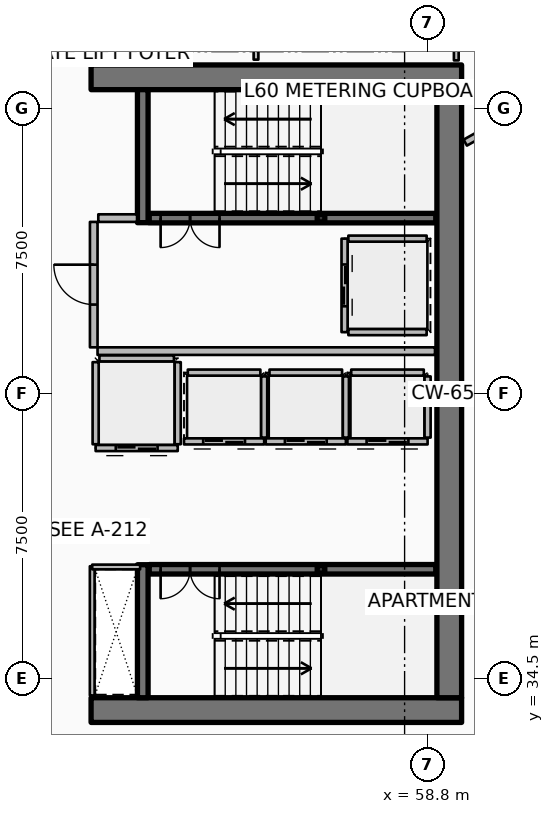
"""IFC4 building model, lengths in metres.
Left out: names, types, materials, properties, quantities, classifications, styles, units other than length and angle.
Written with IfcOpenShell. Run it as: python <this file> out.ifc"""

import sys

from ifc_helpers import new_model, si_unit, direction, frame, frame_2d, origin, origin_2d, place, context, subcontext, project, spatial, rectangle, hollow_rectangle, extrude, element, fill, save


model = new_model("IFC4")
c1 = context("Model", 3, precision=1e-05, world=origin(), true_north=direction((0.0, 1.0)))
c2 = subcontext(c1, "Body", "Model", "MODEL_VIEW")
j1 = project(units=[si_unit("LENGTHUNIT", "METRE"), si_unit("PLANEANGLEUNIT", "RADIAN")], contexts=[c1])
p1 = place(None, origin())
s1 = spatial("IfcSite", under=j1, at=p1, CompositionType="ELEMENT")
p2 = place(p1, origin())
s2 = spatial("IfcBuilding", under=s1, at=p2, CompositionType="ELEMENT")
p3 = place(p2, frame((0.0, 0.0, 240.55)))
s3 = spatial("IfcBuildingStorey", under=s2, at=p3, CompositionType="ELEMENT", Elevation=240.55)
for number, where, z_axis, x_axis in (
    (1, (49.95, 33.675, 0.0), (0.0, 0.0, 1.0), (1.0, 0.0, 0.0)),
    (2, (49.95, 50.325, 0.0), (0.0, 0.0, 1.0), (1.0, 0.0, 0.0)),
):
    element("IfcWall", number, at=place(p3, frame(where, z_axis=z_axis, x_axis=x_axis)), inside=s3, PredefinedType="SHEAR", context=c2, shape_type="SweptSolid", body=[
        extrude(rectangle(XDim=9.75, YDim=0.65, at=frame_2d((4.875, 0.0))), origin(), (0.0, 0.0, 1.0), 3.85),
    ])
p4 = place(p3, frame((59.375, 34.0, 0.0), z_axis=(0.0, 0.0, 1.0), x_axis=(0.0, 1.0, 0.0)))
e3 = element("IfcWall", 3, at=p4, inside=s3, PredefinedType="SHEAR", context=c2, shape_type="SweptSolid", body=[
    extrude(rectangle(XDim=16.0, YDim=0.65, at=frame_2d((8.0, 0.0))), origin(), (0.0, 0.0, 1.0), 3.85),
])
for number, where, z_axis, x_axis in (
    (4, (51.31, 46.5, 0.0), (0.0, 0.0, 1.0), (0.0, 1.0, 0.0)),
    (5, (51.31, 34.0, 0.0), (0.0, 0.0, 1.0), (0.0, 1.0, 0.0)),
):
    element("IfcWall", number, at=place(p3, frame(where, z_axis=z_axis, x_axis=x_axis)), inside=s3, PredefinedType="SHEAR", context=c2, shape_type="SweptSolid", body=[
        extrude(rectangle(XDim=3.5, YDim=0.28, at=frame_2d((1.75, 0.0))), origin(), (0.0, 0.0, 1.0), 3.85),
    ])
for number, where, z_axis, x_axis in (
    (6, (56.0, 46.62, 0.0), (0.0, 0.0, 1.0), (1.0, 0.0, 0.0)),
    (7, (56.0, 37.38, 0.0), (0.0, 0.0, 1.0), (1.0, 0.0, 0.0)),
):
    element("IfcColumn", number, at=place(p3, frame(where, z_axis=z_axis, x_axis=x_axis)), inside=s3, PredefinedType="COLUMN", context=c2, shape_type="SweptSolid", body=[
        extrude(hollow_rectangle(XDim=0.2, YDim=0.2, WallThickness=0.01, InnerFilletRadius=0.01, OuterFilletRadius=0.02, at=origin_2d()), origin(), (0.0, 0.0, 1.0), 1.72),
    ])
p5 = place(p3, frame((51.48, 46.62, 0.0), z_axis=(0.0, 0.0, 1.0), x_axis=(1.0, 0.0, 0.0)))
e8 = element("IfcWall", 8, at=p5, inside=s3, PredefinedType="SOLIDWALL", context=c2, shape_type="SweptSolid", body=[
    extrude(rectangle(XDim=7.54, YDim=0.25, at=frame_2d((3.77, 0.0))), origin(), (0.0, 0.0, 1.0), 3.59),
])
p6 = place(p5, frame((0.3, 0.0, 0.0)))
e9 = element("IfcOpeningElement", 9, at=p6, cuts=e8, PredefinedType="OPENING", context=c2, shape_type="SweptSolid", body=[
    extrude(rectangle(XDim=1.55, YDim=2.15, at=frame_2d((0.775, 1.075))), frame((0.0, 0.135, 0.0), z_axis=(0.0, -1.0, 0.0), x_axis=(1.0, 0.0, 0.0)), (0.0, 0.0, 1.0), 0.27),
])
p7 = place(p3, frame((51.48, 37.38, 0.0), z_axis=(0.0, 0.0, 1.0), x_axis=(1.0, 0.0, 0.0)))
e10 = element("IfcWall", 10, at=p7, inside=s3, PredefinedType="SOLIDWALL", context=c2, shape_type="SweptSolid", body=[
    extrude(rectangle(XDim=7.54, YDim=0.25, at=frame_2d((3.77, 0.0))), origin(), (0.0, 0.0, 1.0), 3.59),
])
p8 = place(p7, frame((0.3, 0.0, 0.0)))
e11 = element("IfcOpeningElement", 11, at=p8, cuts=e10, PredefinedType="OPENING", context=c2, shape_type="SweptSolid", body=[
    extrude(rectangle(XDim=1.55, YDim=2.15, at=frame_2d((0.775, 1.075))), frame((0.0, 0.135, 0.0), z_axis=(0.0, -1.0, 0.0), x_axis=(1.0, 0.0, 0.0)), (0.0, 0.0, 1.0), 0.27),
])
p9 = place(p3, frame((54.505, 40.745, 0.0), z_axis=(0.0, 0.0, 1.0), x_axis=(-1.0, 0.0, 0.0)))
e12 = element("IfcWall", 12, at=p9, inside=s3, PredefinedType="PARTITIONING", context=c2, shape_type="SweptSolid", body=[
    extrude(rectangle(XDim=2.11, YDim=0.16, at=frame_2d((1.055, 0.0))), origin(), (0.0, 0.0, 1.0), 3.59),
])
p10 = place(p9, frame((0.505, 0.0, 0.0)))
e13 = element("IfcOpeningElement", 13, at=p10, cuts=e12, PredefinedType="OPENING", context=c2, shape_type="SweptSolid", body=[
    extrude(rectangle(XDim=1.1, YDim=2.1, at=frame_2d((0.55, 1.05))), frame((0.0, 0.09, 0.0), z_axis=(0.0, -1.0, 0.0), x_axis=(1.0, 0.0, 0.0)), (0.0, 0.0, 1.0), 0.18),
])
p11 = place(p3, frame((54.505, 40.845, 0.0), z_axis=(0.0, 0.0, 1.0), x_axis=(0.0, 1.0, 0.0)))
e14 = element("IfcWall", 14, at=p11, inside=s3, PredefinedType="PARTITIONING", context=c2, shape_type="SweptSolid", body=[
    extrude(rectangle(XDim=1.61, YDim=0.16, at=frame_2d((0.805, 0.0))), origin(), (0.0, 0.0, 1.0), 3.59),
])
p12 = place(p3, frame((52.495, 42.555, 0.0), z_axis=(0.0, 0.0, 1.0), x_axis=(1.0, 0.0, 0.0)))
e15 = element("IfcWall", 15, at=p12, inside=s3, PredefinedType="PARTITIONING", context=c2, shape_type="SweptSolid", body=[
    extrude(rectangle(XDim=1.91, YDim=0.16, at=frame_2d((0.955, 0.0))), origin(), (0.0, 0.0, 1.0), 3.59),
])
p13 = place(p3, frame((56.655, 40.745, 0.0), z_axis=(0.0, 0.0, 1.0), x_axis=(-1.0, 0.0, 0.0)))
e16 = element("IfcWall", 16, at=p13, inside=s3, PredefinedType="PARTITIONING", context=c2, shape_type="SweptSolid", body=[
    extrude(rectangle(XDim=2.11, YDim=0.16, at=frame_2d((1.055, 0.0))), origin(), (0.0, 0.0, 1.0), 3.59),
])
p14 = place(p13, frame((0.505, 0.0, 0.0)))
e17 = element("IfcOpeningElement", 17, at=p14, cuts=e16, PredefinedType="OPENING", context=c2, shape_type="SweptSolid", body=[
    extrude(rectangle(XDim=1.1, YDim=2.1, at=frame_2d((0.55, 1.05))), frame((0.0, 0.09, 0.0), z_axis=(0.0, -1.0, 0.0), x_axis=(1.0, 0.0, 0.0)), (0.0, 0.0, 1.0), 0.18),
])
p15 = place(p3, frame((56.655, 40.845, 0.0), z_axis=(0.0, 0.0, 1.0), x_axis=(0.0, 1.0, 0.0)))
e18 = element("IfcWall", 18, at=p15, inside=s3, PredefinedType="PARTITIONING", context=c2, shape_type="SweptSolid", body=[
    extrude(rectangle(XDim=1.61, YDim=0.16, at=frame_2d((0.805, 0.0))), origin(), (0.0, 0.0, 1.0), 3.59),
])
p16 = place(p3, frame((54.645, 42.555, 0.0), z_axis=(0.0, 0.0, 1.0), x_axis=(1.0, 0.0, 0.0)))
e19 = element("IfcWall", 19, at=p16, inside=s3, PredefinedType="PARTITIONING", context=c2, shape_type="SweptSolid", body=[
    extrude(rectangle(XDim=1.91, YDim=0.16, at=frame_2d((0.955, 0.0))), origin(), (0.0, 0.0, 1.0), 3.59),
])
p17 = place(p3, frame((58.805, 40.745, 0.0), z_axis=(0.0, 0.0, 1.0), x_axis=(-1.0, 0.0, 0.0)))
e20 = element("IfcWall", 20, at=p17, inside=s3, PredefinedType="PARTITIONING", context=c2, shape_type="SweptSolid", body=[
    extrude(rectangle(XDim=2.11, YDim=0.16, at=frame_2d((1.055, 0.0))), origin(), (0.0, 0.0, 1.0), 3.59),
])
p18 = place(p17, frame((0.505, 0.0, 0.0)))
e21 = element("IfcOpeningElement", 21, at=p18, cuts=e20, PredefinedType="OPENING", context=c2, shape_type="SweptSolid", body=[
    extrude(rectangle(XDim=1.1, YDim=2.1, at=frame_2d((0.55, 1.05))), frame((0.0, 0.09, 0.0), z_axis=(0.0, -1.0, 0.0), x_axis=(1.0, 0.0, 0.0)), (0.0, 0.0, 1.0), 0.18),
])
p19 = place(p3, frame((58.805, 40.845, 0.0), z_axis=(0.0, 0.0, 1.0), x_axis=(0.0, 1.0, 0.0)))
e22 = element("IfcWall", 22, at=p19, inside=s3, PredefinedType="PARTITIONING", context=c2, shape_type="SweptSolid", body=[
    extrude(rectangle(XDim=1.61, YDim=0.16, at=frame_2d((0.805, 0.0))), origin(), (0.0, 0.0, 1.0), 3.59),
])
p20 = place(p3, frame((56.795, 42.555, 0.0), z_axis=(0.0, 0.0, 1.0), x_axis=(1.0, 0.0, 0.0)))
e23 = element("IfcWall", 23, at=p20, inside=s3, PredefinedType="PARTITIONING", context=c2, shape_type="SweptSolid", body=[
    extrude(rectangle(XDim=1.91, YDim=0.16, at=frame_2d((0.955, 0.0))), origin(), (0.0, 0.0, 1.0), 3.59),
])
p21 = place(p3, frame((56.62, 46.08, 0.0), z_axis=(0.0, 0.0, 1.0), x_axis=(0.0, -1.0, 0.0)))
e24 = element("IfcWall", 24, at=p21, inside=s3, PredefinedType="PARTITIONING", context=c2, shape_type="SweptSolid", body=[
    extrude(rectangle(XDim=2.46, YDim=0.16, at=frame_2d((1.23, 0.0))), origin(), (0.0, 0.0, 1.0), 3.59),
])
p22 = place(p21, frame((0.68, 0.0, 0.0)))
e25 = element("IfcOpeningElement", 25, at=p22, cuts=e24, PredefinedType="OPENING", context=c2, shape_type="SweptSolid", body=[
    extrude(rectangle(XDim=1.1, YDim=2.1, at=frame_2d((0.55, 1.05))), frame((0.0, 0.09, 0.0), z_axis=(0.0, -1.0, 0.0), x_axis=(1.0, 0.0, 0.0)), (0.0, 0.0, 1.0), 0.18),
])
for number, where, z_axis, x_axis in (
    (26, (56.72, 46.08, 0.0), (0.0, 0.0, 1.0), (1.0, 0.0, 0.0)),
    (27, (56.72, 43.62, 0.0), (0.0, 0.0, 1.0), (1.0, 0.0, 0.0)),
):
    element("IfcWall", number, at=place(p3, frame(where, z_axis=z_axis, x_axis=x_axis)), inside=s3, PredefinedType="PARTITIONING", context=c2, shape_type="SweptSolid", body=[
        extrude(rectangle(XDim=2.06, YDim=0.16, at=frame_2d((1.03, 0.0))), origin(), (0.0, 0.0, 1.0), 3.59),
    ])
p23 = place(p3, frame((52.23, 40.57, 0.0), z_axis=(0.0, 0.0, 1.0), x_axis=(-1.0, 0.0, 0.0)))
e28 = element("IfcWall", 28, at=p23, inside=s3, PredefinedType="PARTITIONING", context=c2, shape_type="SweptSolid", body=[
    extrude(rectangle(XDim=2.16, YDim=0.16, at=frame_2d((1.08, 0.0))), origin(), (0.0, 0.0, 1.0), 3.59),
])
p24 = place(p23, frame((0.53, 0.0, 0.0)))
e29 = element("IfcOpeningElement", 29, at=p24, cuts=e28, PredefinedType="OPENING", context=c2, shape_type="SweptSolid", body=[
    extrude(rectangle(XDim=1.1, YDim=2.1, at=frame_2d((0.55, 1.05))), frame((0.0, 0.09, 0.0), z_axis=(0.0, -1.0, 0.0), x_axis=(1.0, 0.0, 0.0)), (0.0, 0.0, 1.0), 0.18),
])
for number, where, z_axis, x_axis in (
    (30, (52.23, 40.67, 0.0), (0.0, 0.0, 1.0), (0.0, 1.0, 0.0)),
    (31, (50.07, 40.67, 0.0), (0.0, 0.0, 1.0), (0.0, 1.0, 0.0)),
):
    element("IfcWall", number, at=place(p3, frame(where, z_axis=z_axis, x_axis=x_axis)), inside=s3, PredefinedType="PARTITIONING", context=c2, shape_type="SweptSolid", body=[
        extrude(rectangle(XDim=2.16, YDim=0.16, at=frame_2d((1.08, 0.0))), origin(), (0.0, 0.0, 1.0), 3.59),
    ])
p25 = place(p3, frame((50.17, 42.93, 0.0), z_axis=(0.0, 0.0, 1.0), x_axis=(1.0, 0.0, 0.0)))
e32 = element("IfcWall", 32, at=p25, inside=s3, PredefinedType="PARTITIONING", context=c2, shape_type="SweptSolid", body=[
    extrude(rectangle(XDim=1.96, YDim=0.16, at=frame_2d((0.98, 0.0))), origin(), (0.0, 0.0, 1.0), 3.59),
])
p26 = place(p3, frame((50.12, 43.12, 0.0), z_axis=(0.0, 0.0, 1.0), x_axis=(1.0, 0.0, 0.0)))
e33 = element("IfcWall", 33, at=p26, inside=s3, PredefinedType="PARTITIONING", context=c2, shape_type="SweptSolid", body=[
    extrude(rectangle(XDim=8.88, YDim=0.2, at=frame_2d((4.44, 0.0))), origin(), (0.0, 0.0, 1.0), 3.59),
])
p27 = place(p3, frame((50.14, 46.62, 0.0), z_axis=(0.0, 0.0, 1.0), x_axis=(1.0, 0.0, 0.0)))
e34 = element("IfcWall", 34, at=p27, inside=s3, PredefinedType="PARTITIONING", context=c2, shape_type="SweptSolid", body=[
    extrude(rectangle(XDim=1.02, YDim=0.2, at=frame_2d((0.51, 0.0))), origin(), (0.0, 0.0, 1.0), 3.59),
])
p28 = place(p3, frame((50.02, 43.22, 0.0), z_axis=(0.0, 0.0, 1.0), x_axis=(0.0, 1.0, 0.0)))
e35 = element("IfcWall", 35, at=p28, inside=s3, PredefinedType="PARTITIONING", context=c2, shape_type="SweptSolid", body=[
    extrude(rectangle(XDim=3.3, YDim=0.2, at=frame_2d((1.65, 0.0))), origin(), (0.0, 0.0, 1.0), 3.59),
])
p29 = place(p28, frame((1.125, 0.0, 0.0)))
e36 = element("IfcOpeningElement", 36, at=p29, cuts=e35, PredefinedType="OPENING", context=c2, shape_type="SweptSolid", body=[
    extrude(rectangle(XDim=1.05, YDim=2.1, at=frame_2d((0.525, 1.05))), frame((0.0, 0.11, 0.0), z_axis=(0.0, -1.0, 0.0), x_axis=(1.0, 0.0, 0.0)), (0.0, 0.0, 1.0), 0.22),
])
p30 = place(p3, frame((49.98, 34.06, 0.0), z_axis=(0.0, 0.0, 1.0), x_axis=(0.0, 1.0, 0.0)))
e37 = element("IfcWall", 37, at=p30, inside=s3, PredefinedType="PARTITIONING", context=c2, shape_type="SweptSolid", body=[
    extrude(rectangle(XDim=3.4, YDim=0.125, at=frame_2d((1.7, 0.0))), origin(), (0.0, 0.0, 1.0), 3.03),
])
p31 = place(p3, frame((49.98, 37.44, 0.0), z_axis=(0.0, 0.0, 1.0), x_axis=(1.0, 0.0, 0.0)))
e38 = element("IfcWall", 38, at=p31, inside=s3, PredefinedType="PARTITIONING", context=c2, shape_type="SweptSolid", body=[
    extrude(rectangle(XDim=1.26, YDim=0.125, at=frame_2d((0.63, 0.0))), origin(), (0.0, 0.0, 1.0), 3.03),
])
p32 = place(p3, frame((59.56, 50.77, 0.0), z_axis=(0.0, 0.0, 1.0), x_axis=(0.0, 1.0, 0.0)))
e39 = element("IfcWall", 39, at=p32, inside=s3, PredefinedType="PARTITIONING", context=c2, shape_type="SweptSolid", body=[
    extrude(rectangle(XDim=1.54, YDim=0.125, at=frame_2d((0.77, 0.0))), origin(), (0.0, 0.0, 1.0), 3.03),
])
p33 = place(p3, frame((54.29, 50.79, 0.0), z_axis=(0.0, 0.0, 1.0), x_axis=(0.0, 1.0, 0.0)))
e40 = element("IfcWall", 40, at=p33, inside=s3, PredefinedType="PARTITIONING", context=c2, shape_type="SweptSolid", body=[
    extrude(rectangle(XDim=1.52, YDim=0.125, at=frame_2d((0.76, 0.0))), origin(), (0.0, 0.0, 1.0), 3.03),
])
p34 = place(p33, frame((0.335, 0.0, 0.0)))
e41 = element("IfcOpeningElement", 41, at=p34, cuts=e40, PredefinedType="OPENING", context=c2, shape_type="SweptSolid", body=[
    extrude(rectangle(XDim=0.85, YDim=2.06, at=frame_2d((0.425, 1.03))), frame((0.0, 0.073, 0.0), z_axis=(0.0, -1.0, 0.0), x_axis=(1.0, 0.0, 0.0)), (0.0, 0.0, 1.0), 0.145),
])
p35 = place(p3, frame((59.796, 48.606, 0.0), z_axis=(0.0, 0.0, 1.0), x_axis=(0.872493213488, 0.488626229767, 0.0)))
e42 = element("IfcWall", 42, at=p35, inside=s3, PredefinedType="PARTITIONING", context=c2, shape_type="SweptSolid", body=[
    extrude(rectangle(XDim=16.91, YDim=0.18, at=frame_2d((8.455, 0.0))), origin(), (0.0, 0.0, 1.0), 2.957),
])
p36 = place(p6, origin())
e43 = element("IfcDoor", 43, at=p36, inside=s3, OperationType="DOUBLE_DOOR_SINGLE_SWING", PredefinedType="DOOR", context=c2, shape_type="SweptSolid", body=[
    extrude(rectangle(XDim=1.55, YDim=2.15, at=frame_2d((0.775, 1.075))), frame((0.0, 0.025, 0.0), z_axis=(0.0, -1.0, 0.0), x_axis=(1.0, 0.0, 0.0)), (0.0, 0.0, 1.0), 0.05),
])
fill(e9, e43)
p37 = place(p8, origin())
e44 = element("IfcDoor", 44, at=p37, inside=s3, OperationType="DOUBLE_DOOR_SINGLE_SWING", PredefinedType="DOOR", context=c2, shape_type="SweptSolid", body=[
    extrude(rectangle(XDim=1.55, YDim=2.15, at=frame_2d((0.775, 1.075))), frame((0.0, 0.025, 0.0), z_axis=(0.0, -1.0, 0.0), x_axis=(1.0, 0.0, 0.0)), (0.0, 0.0, 1.0), 0.05),
])
fill(e11, e44)
p38 = place(p10, origin())
e45 = element("IfcDoor", 45, at=p38, inside=s3, OperationType="DOUBLE_DOOR_SLIDING", PredefinedType="DOOR", context=c2, shape_type="SweptSolid", body=[
    extrude(rectangle(XDim=1.1, YDim=2.1, at=frame_2d((0.55, 1.05))), frame((0.0, 0.025, 0.0), z_axis=(0.0, -1.0, 0.0), x_axis=(1.0, 0.0, 0.0)), (0.0, 0.0, 1.0), 0.05),
])
fill(e13, e45)
p39 = place(p14, origin())
e46 = element("IfcDoor", 46, at=p39, inside=s3, OperationType="DOUBLE_DOOR_SLIDING", PredefinedType="DOOR", context=c2, shape_type="SweptSolid", body=[
    extrude(rectangle(XDim=1.1, YDim=2.1, at=frame_2d((0.55, 1.05))), frame((0.0, 0.025, 0.0), z_axis=(0.0, -1.0, 0.0), x_axis=(1.0, 0.0, 0.0)), (0.0, 0.0, 1.0), 0.05),
])
fill(e17, e46)
p40 = place(p18, origin())
e47 = element("IfcDoor", 47, at=p40, inside=s3, OperationType="DOUBLE_DOOR_SLIDING", PredefinedType="DOOR", context=c2, shape_type="SweptSolid", body=[
    extrude(rectangle(XDim=1.1, YDim=2.1, at=frame_2d((0.55, 1.05))), frame((0.0, 0.025, 0.0), z_axis=(0.0, -1.0, 0.0), x_axis=(1.0, 0.0, 0.0)), (0.0, 0.0, 1.0), 0.05),
])
fill(e21, e47)
p41 = place(p22, origin())
e48 = element("IfcDoor", 48, at=p41, inside=s3, OperationType="DOUBLE_DOOR_SLIDING", PredefinedType="DOOR", context=c2, shape_type="SweptSolid", body=[
    extrude(rectangle(XDim=1.1, YDim=2.1, at=frame_2d((0.55, 1.05))), frame((0.0, 0.025, 0.0), z_axis=(0.0, -1.0, 0.0), x_axis=(1.0, 0.0, 0.0)), (0.0, 0.0, 1.0), 0.05),
])
fill(e25, e48)
p42 = place(p24, origin())
e49 = element("IfcDoor", 49, at=p42, inside=s3, OperationType="DOUBLE_DOOR_SLIDING", PredefinedType="DOOR", context=c2, shape_type="SweptSolid", body=[
    extrude(rectangle(XDim=1.1, YDim=2.1, at=frame_2d((0.55, 1.05))), frame((0.0, 0.025, 0.0), z_axis=(0.0, -1.0, 0.0), x_axis=(1.0, 0.0, 0.0)), (0.0, 0.0, 1.0), 0.05),
])
fill(e29, e49)
p43 = place(p29, origin())
e50 = element("IfcDoor", 50, at=p43, inside=s3, OperationType="SINGLE_SWING_RIGHT", PredefinedType="DOOR", context=c2, shape_type="SweptSolid", body=[
    extrude(rectangle(XDim=1.05, YDim=2.1, at=frame_2d((0.525, 1.05))), frame((0.0, 0.025, 0.0), z_axis=(0.0, -1.0, 0.0), x_axis=(1.0, 0.0, 0.0)), (0.0, 0.0, 1.0), 0.05),
])
fill(e36, e50)
save(model, sys.argv[1])
